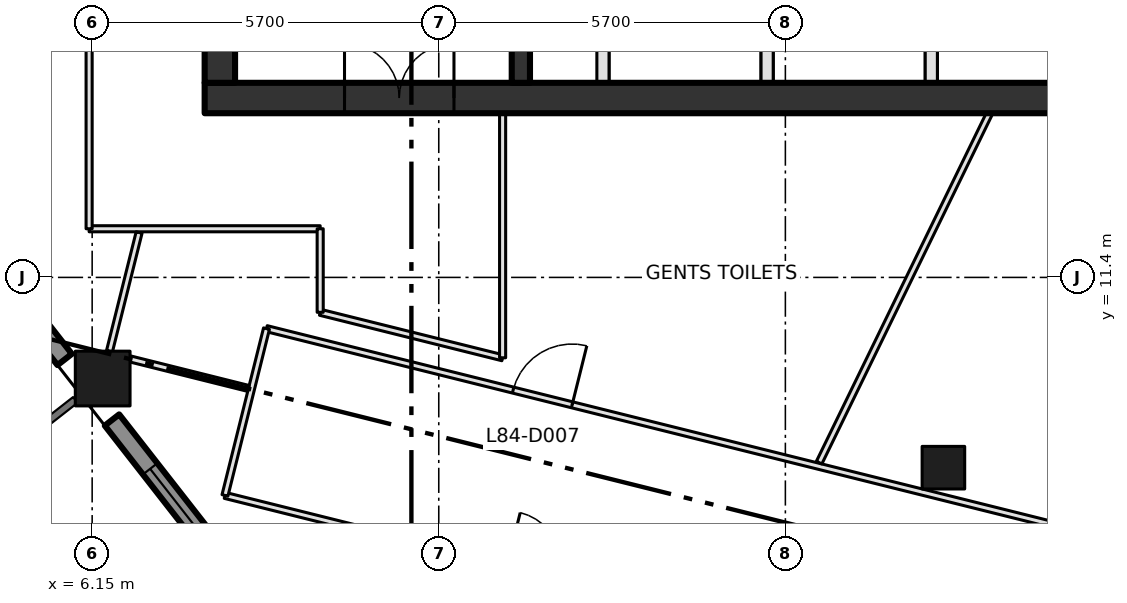
"""IFC4 building model, lengths in metres.
Left out: names, types, materials, properties, quantities, classifications, styles, units other than length and angle.
Written with IfcOpenShell. Run it as: python <this file> out.ifc"""

import sys

from ifc_helpers import new_model, si_unit, direction, frame, frame_2d, origin, origin_2d, place, context, subcontext, project, spatial, rectangle, extrude, element, fill, save


model = new_model("IFC4")
c1 = context("Model", 3, precision=1e-05, world=origin(), true_north=direction((0.0, 1.0)))
c2 = subcontext(c1, "Body", "Model", "MODEL_VIEW")
j1 = project(units=[si_unit("LENGTHUNIT", "METRE"), si_unit("PLANEANGLEUNIT", "RADIAN")], contexts=[c1])
p1 = place(None, origin())
s1 = spatial("IfcSite", under=j1, at=p1, CompositionType="ELEMENT")
p2 = place(p1, origin())
s2 = spatial("IfcBuilding", under=s1, at=p2, CompositionType="ELEMENT")
p3 = place(p2, frame((0.0, 0.0, 366.6)))
s3 = spatial("IfcBuildingStorey", under=s2, at=p3, CompositionType="ELEMENT", Elevation=366.6)
p4 = place(p3, frame((6.323, 9.737, 0.0), z_axis=(0.0, 0.0, 1.0), x_axis=(1.0, 0.0, 0.0)))
e1 = element("IfcColumn", 1, at=p4, inside=s3, PredefinedType="COLUMN", context=c2, shape_type="SweptSolid", body=[
    extrude(rectangle(XDim=0.9, YDim=0.9, at=origin_2d()), origin(), (0.0, 0.0, 1.0), 4.2),
])
p5 = place(p3, frame((20.149, 8.271, 0.0), z_axis=(0.0, 0.0, 1.0), x_axis=(1.0, 0.0, 0.0)))
e2 = element("IfcColumn", 2, at=p5, inside=s3, PredefinedType="COLUMN", context=c2, shape_type="SweptSolid", body=[
    extrude(rectangle(XDim=0.7, YDim=0.7, at=origin_2d()), origin(), (0.0, 0.0, 1.0), 4.2),
])
p6 = place(p3, frame((8.0, 14.35, -0.3), z_axis=(0.0, 0.0, 1.0), x_axis=(1.0, 0.0, 0.0)))
e3 = element("IfcWall", 3, at=p6, inside=s3, PredefinedType="SHEAR", context=c2, shape_type="SweptSolid", body=[
    extrude(rectangle(XDim=22.8, YDim=0.5, at=frame_2d((11.4, 0.0))), origin(), (0.0, 0.0, 1.0), 4.2),
])
p7 = place(p6, frame((2.3, 0.0, 0.3)))
e4 = element("IfcOpeningElement", 4, at=p7, cuts=e3, PredefinedType="OPENING", context=c2, shape_type="SweptSolid", body=[
    extrude(rectangle(XDim=1.8, YDim=2.1, at=frame_2d((0.9, 1.05))), frame((0.0, 0.26, 0.0), z_axis=(0.0, -1.0, 0.0), x_axis=(1.0, 0.0, 0.0)), (0.0, 0.0, 1.0), 0.52),
])
p8 = place(p3, frame((8.25, 14.6, -0.3), z_axis=(0.0, 0.0, 1.0), x_axis=(0.0, 1.0, 0.0)))
e5 = element("IfcWall", 5, at=p8, inside=s3, PredefinedType="SHEAR", context=c2, shape_type="SweptSolid", body=[
    extrude(rectangle(XDim=21.1, YDim=0.5, at=frame_2d((10.55, 0.0))), origin(), (0.0, 0.0, 1.0), 4.2),
])
p9 = place(p3, frame((13.2, 14.6, 0.0), z_axis=(0.0, 0.0, 1.0), x_axis=(0.0, 1.0, 0.0)))
e6 = element("IfcWall", 6, at=p9, inside=s3, PredefinedType="SHEAR", context=c2, shape_type="SweptSolid", body=[
    extrude(rectangle(XDim=21.1, YDim=0.3, at=frame_2d((10.55, 0.0))), origin(), (0.0, 0.0, 1.0), 3.9),
])
p10 = place(p9, frame((3.7, 0.0, 0.0)))
e7 = element("IfcOpeningElement", 7, at=p10, cuts=e6, PredefinedType="OPENING", context=c2, shape_type="SweptSolid", body=[
    extrude(rectangle(XDim=1.8, YDim=2.1, at=frame_2d((0.9, 1.05))), frame((0.0, 0.16, 0.0), z_axis=(0.0, -1.0, 0.0), x_axis=(1.0, 0.0, 0.0)), (0.0, 0.0, 1.0), 0.32),
])
p11 = place(p9, frame((11.8, 0.0, 0.0)))
e8 = element("IfcOpeningElement", 8, at=p11, cuts=e6, PredefinedType="OPENING", context=c2, shape_type="SweptSolid", body=[
    extrude(rectangle(XDim=1.2, YDim=2.1, at=frame_2d((0.6, 1.05))), frame((0.0, 0.16, 0.0), z_axis=(0.0, -1.0, 0.0), x_axis=(1.0, 0.0, 0.0)), (0.0, 0.0, 1.0), 0.32),
])
for number, where, z_axis, x_axis in (
    (9, (14.55, 14.6, 0.0), (0.0, 0.0, 1.0), (0.0, 1.0, 0.0)),
    (10, (17.25, 14.6, 0.0), (0.0, 0.0, 1.0), (0.0, 1.0, 0.0)),
    (11, (19.95, 14.6, 0.0), (0.0, 0.0, 1.0), (0.0, 1.0, 0.0)),
):
    element("IfcWall", number, at=place(p3, frame(where, z_axis=z_axis, x_axis=x_axis)), inside=s3, PredefinedType="SOLIDWALL", context=c2, shape_type="SweptSolid", body=[
        extrude(rectangle(XDim=3.0, YDim=0.2, at=frame_2d((1.5, 0.0))), origin(), (0.0, 0.0, 1.0), 3.9),
    ])
p12 = place(p3, frame((2.967, 13.547, 0.0), z_axis=(0.0, 0.0, 1.0), x_axis=(0.615486001463, -0.788147817356, 0.0)))
e12 = element("IfcWall", 12, at=p12, inside=s3, PredefinedType="SOLIDWALL", context=c2, shape_type="SweptSolid", body=[
    extrude(rectangle(XDim=4.437, YDim=0.3, at=frame_2d((2.219, 0.0))), origin(), (0.0, 0.0, 1.0), 3.2),
])
p13 = place(p12, frame((1.018, 0.0, 0.8)))
e13 = element("IfcOpeningElement", 13, at=p13, cuts=e12, PredefinedType="OPENING", context=c2, shape_type="SweptSolid", body=[
    extrude(rectangle(XDim=2.4, YDim=2.1, at=frame_2d((1.2, 1.05))), frame((0.0, 0.16, 0.0), z_axis=(0.0, -1.0, 0.0), x_axis=(1.0, 0.0, 0.0)), (0.0, 0.0, 1.0), 0.32),
])
p14 = place(p3, frame((6.476, 9.055, 0.0), z_axis=(0.0, 0.0, 1.0), x_axis=(0.615649380255, -0.788020203162, 0.0)))
e14 = element("IfcWall", 14, at=p14, inside=s3, PredefinedType="SOLIDWALL", context=c2, shape_type="SweptSolid", body=[
    extrude(rectangle(XDim=4.438, YDim=0.3, at=frame_2d((2.219, 0.0))), origin(), (0.0, 0.0, 1.0), 3.2),
])
p15 = place(p14, frame((1.019, 0.0, 0.8)))
e15 = element("IfcOpeningElement", 15, at=p15, cuts=e14, PredefinedType="OPENING", context=c2, shape_type="SweptSolid", body=[
    extrude(rectangle(XDim=2.4, YDim=2.1, at=frame_2d((1.2, 1.05))), frame((0.0, 0.16, 0.0), z_axis=(0.0, -1.0, 0.0), x_axis=(1.0, 0.0, 0.0)), (0.0, 0.0, 1.0), 0.32),
])
p16 = place(p3, frame((6.1, 12.2, 0.0), z_axis=(0.0, 0.0, 1.0), x_axis=(1.0, 0.0, 0.0)))
e16 = element("IfcWall", 16, at=p16, inside=s3, PredefinedType="PARTITIONING", context=c2, shape_type="SweptSolid", body=[
    extrude(rectangle(XDim=3.8, YDim=0.1, at=frame_2d((1.9, 0.0))), origin(), (0.0, 0.0, 1.0), 3.9),
])
p17 = place(p3, frame((6.1, 38.9, 0.0), z_axis=(0.0, 0.0, 1.0), x_axis=(0.0, -1.0, 0.0)))
e17 = element("IfcWall", 17, at=p17, inside=s3, PredefinedType="PARTITIONING", context=c2, shape_type="SweptSolid", body=[
    extrude(rectangle(XDim=26.7, YDim=0.1, at=frame_2d((13.35, 0.0))), origin(), (0.0, 0.0, 1.0), 3.9),
])
p18 = place(p17, frame((21.068, 0.0, 0.0)))
e18 = element("IfcOpeningElement", 18, at=p18, cuts=e17, PredefinedType="OPENING", context=c2, shape_type="SweptSolid", body=[
    extrude(rectangle(XDim=1.0, YDim=2.1, at=frame_2d((0.5, 1.05))), frame((0.0, 0.06, 0.0), z_axis=(0.0, -1.0, 0.0), x_axis=(1.0, 0.0, 0.0)), (0.0, 0.0, 1.0), 0.12),
])
p19 = place(p17, frame((10.568, 0.0, 0.0)))
e19 = element("IfcOpeningElement", 19, at=p19, cuts=e17, PredefinedType="OPENING", context=c2, shape_type="SweptSolid", body=[
    extrude(rectangle(XDim=1.0, YDim=2.1, at=frame_2d((0.5, 1.05))), frame((0.0, 0.06, 0.0), z_axis=(0.0, -1.0, 0.0), x_axis=(1.0, 0.0, 0.0)), (0.0, 0.0, 1.0), 0.12),
])
p20 = place(p3, frame((8.334, 7.815, 0.0), z_axis=(0.0, 0.0, 1.0), x_axis=(0.970312231044, -0.241855688968, 0.0)))
e20 = element("IfcWall", 20, at=p20, inside=s3, PredefinedType="PARTITIONING", context=c2, shape_type="SweptSolid", body=[
    extrude(rectangle(XDim=11.069, YDim=0.1, at=frame_2d((5.534, 0.0))), origin(), (0.0, 0.0, 1.0), 3.9),
])
p21 = place(p20, frame((4.78, 0.0, 0.0)))
e21 = element("IfcOpeningElement", 21, at=p21, cuts=e20, PredefinedType="OPENING", context=c2, shape_type="SweptSolid", body=[
    extrude(rectangle(XDim=1.8, YDim=2.1, at=frame_2d((0.9, 1.05))), frame((0.0, 0.06, 0.0), z_axis=(0.0, -1.0, 0.0), x_axis=(1.0, 0.0, 0.0)), (0.0, 0.0, 1.0), 0.12),
])
p22 = place(p3, frame((9.017, 10.558, 0.0), z_axis=(0.0, 0.0, 1.0), x_axis=(0.970297621765, -0.241914293082, 0.0)))
e22 = element("IfcWall", 22, at=p22, inside=s3, PredefinedType="PARTITIONING", context=c2, shape_type="SweptSolid", body=[
    extrude(rectangle(XDim=19.879, YDim=0.1, at=frame_2d((9.94, 0.0))), origin(), (0.0, 0.0, 1.0), 3.9),
])
p23 = place(p22, frame((4.18, 0.0, 0.0)))
e23 = element("IfcOpeningElement", 23, at=p23, cuts=e22, PredefinedType="OPENING", context=c2, shape_type="SweptSolid", body=[
    extrude(rectangle(XDim=1.0, YDim=2.1, at=frame_2d((0.5, 1.05))), frame((0.0, 0.06, 0.0), z_axis=(0.0, -1.0, 0.0), x_axis=(1.0, 0.0, 0.0)), (0.0, 0.0, 1.0), 0.12),
])
p24 = place(p22, frame((14.018, 0.0, 0.0)))
e24 = element("IfcOpeningElement", 24, at=p24, cuts=e22, PredefinedType="OPENING", context=c2, shape_type="SweptSolid", body=[
    extrude(rectangle(XDim=1.0, YDim=2.1, at=frame_2d((0.5, 1.05))), frame((0.0, 0.06, 0.0), z_axis=(0.0, -1.0, 0.0), x_axis=(1.0, 0.0, 0.0)), (0.0, 0.0, 1.0), 0.12),
])
p25 = place(p3, frame((9.017, 10.558, 0.0), z_axis=(0.0, 0.0, 1.0), x_axis=(-0.241641419317, -0.970365613813, 0.0)))
e25 = element("IfcWall", 25, at=p25, inside=s3, PredefinedType="PARTITIONING", context=c2, shape_type="SweptSolid", body=[
    extrude(rectangle(XDim=2.827, YDim=0.1, at=frame_2d((1.414, 0.0))), origin(), (0.0, 0.0, 1.0), 3.9),
])
p26 = place(p3, frame((9.9, 10.826, 0.0), z_axis=(0.0, 0.0, 1.0), x_axis=(0.970290953223, -0.241941038466, 0.0)))
e26 = element("IfcWall", 26, at=p26, inside=s3, PredefinedType="PARTITIONING", context=c2, shape_type="SweptSolid", body=[
    extrude(rectangle(XDim=3.092, YDim=0.1, at=frame_2d((1.546, 0.0))), origin(), (0.0, 0.0, 1.0), 3.9),
])
p27 = place(p3, frame((9.9, 12.2, 0.0), z_axis=(0.0, 0.0, 1.0), x_axis=(0.0, -1.0, 0.0)))
e27 = element("IfcWall", 27, at=p27, inside=s3, PredefinedType="PARTITIONING", context=c2, shape_type="SweptSolid", body=[
    extrude(rectangle(XDim=1.374, YDim=0.1, at=frame_2d((0.687, 0.0))), origin(), (0.0, 0.0, 1.0), 3.9),
])
p28 = place(p3, frame((12.9, 10.078, 0.0), z_axis=(0.0, 0.0, 1.0), x_axis=(0.0, 1.0, 0.0)))
e28 = element("IfcWall", 28, at=p28, inside=s3, PredefinedType="PARTITIONING", context=c2, shape_type="SweptSolid", body=[
    extrude(rectangle(XDim=4.022, YDim=0.1, at=frame_2d((2.011, 0.0))), origin(), (0.0, 0.0, 1.0), 3.9),
])
p29 = place(p3, frame((6.922, 12.138, 0.0), z_axis=(0.0, 0.0, 1.0), x_axis=(-0.24222136375, -0.97022101139, 0.0)))
e29 = element("IfcWall", 29, at=p29, inside=s3, PredefinedType="PARTITIONING", context=c2, shape_type="SweptSolid", body=[
    extrude(rectangle(XDim=2.011, YDim=0.1, at=frame_2d((1.005, 0.0))), origin(), (0.0, 0.0, 1.0), 3.9),
])
p30 = place(p3, frame((8.72, 9.574, 0.0), z_axis=(0.0, 0.0, 1.0), x_axis=(-0.970221168815, 0.24222073318, 0.0)))
e30 = element("IfcWall", 30, at=p30, inside=s3, PredefinedType="PARTITIONING", context=c2, shape_type="SweptSolid", body=[
    extrude(rectangle(XDim=2.007, YDim=0.1, at=frame_2d((1.003, 0.0))), origin(), (0.0, 0.0, 1.0), 3.9),
])
p31 = place(p3, frame((18.105, 8.354, 0.0), z_axis=(0.0, 0.0, 1.0), x_axis=(0.438424384383, 0.898768078638, 0.0)))
e31 = element("IfcWall", 31, at=p31, inside=s3, PredefinedType="PARTITIONING", context=c2, shape_type="SweptSolid", body=[
    extrude(rectangle(XDim=6.393, YDim=0.1, at=frame_2d((3.197, 0.0))), origin(), (0.0, 0.0, 1.0), 3.9),
])
p32 = place(p7, origin())
e32 = element("IfcDoor", 32, at=p32, inside=s3, OperationType="DOUBLE_DOOR_SINGLE_SWING", PredefinedType="DOOR", context=c2, shape_type="SweptSolid", body=[
    extrude(rectangle(XDim=1.8, YDim=2.1, at=frame_2d((0.9, 1.05))), frame((0.0, 0.025, 0.0), z_axis=(0.0, -1.0, 0.0), x_axis=(1.0, 0.0, 0.0)), (0.0, 0.0, 1.0), 0.05),
])
fill(e4, e32)
p33 = place(p15, origin())
e33 = element("IfcWindow", 33, at=p33, inside=s3, PartitioningType="DOUBLE_PANEL_VERTICAL", PredefinedType="WINDOW", context=c2, shape_type="SweptSolid", body=[
    extrude(rectangle(XDim=2.4, YDim=2.1, at=frame_2d((1.2, 1.05))), frame((0.0, 0.03, 0.0), z_axis=(0.0, -1.0, 0.0), x_axis=(1.0, 0.0, 0.0)), (0.0, 0.0, 1.0), 0.06),
])
fill(e15, e33)
p34 = place(p23, origin())
e34 = element("IfcDoor", 34, at=p34, inside=s3, OperationType="SINGLE_SWING_RIGHT", PredefinedType="DOOR", context=c2, shape_type="SweptSolid", body=[
    extrude(rectangle(XDim=1.0, YDim=2.1, at=frame_2d((0.5, 1.05))), frame((0.0, 0.025, 0.0), z_axis=(0.0, -1.0, 0.0), x_axis=(1.0, 0.0, 0.0)), (0.0, 0.0, 1.0), 0.05),
])
fill(e23, e34)
save(model, sys.argv[1])
